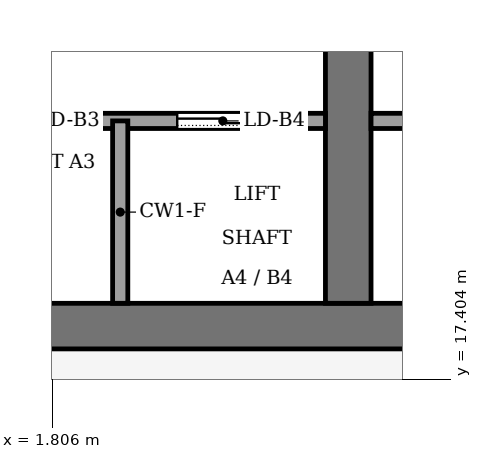
"""IFC4 building model, lengths in metres.
Left out: names, types, materials, properties, quantities, classifications, styles, units other than length and angle.
Written with IfcOpenShell. Run it as: python <this file> out.ifc"""

import sys

from ifc_helpers import new_model, si_unit, direction, frame, frame_2d, origin, place, context, subcontext, project, spatial, rectangle, extrude, element, fill, save


model = new_model("IFC4")
c1 = context("Model", 3, precision=1e-05, world=origin(), true_north=direction((0.0, 1.0)))
c2 = subcontext(c1, "Body", "Model", "MODEL_VIEW")
j1 = project(units=[si_unit("LENGTHUNIT", "METRE"), si_unit("PLANEANGLEUNIT", "RADIAN")], contexts=[c1])
p1 = place(None, origin())
s1 = spatial("IfcSite", under=j1, at=p1, CompositionType="ELEMENT")
p2 = place(p1, origin())
s2 = spatial("IfcBuilding", under=s1, at=p2, CompositionType="ELEMENT")
p3 = place(p2, frame((0.0, 0.0, 306.0)))
s3 = spatial("IfcBuildingStorey", under=s2, at=p3, CompositionType="ELEMENT", Elevation=306.0)
p4 = place(p3, frame((-13.2, 18.1, -0.13), z_axis=(0.0, 0.0, 1.0), x_axis=(1.0, 0.0, 0.0)))
e1 = element("IfcWall", 1, at=p4, inside=s3, PredefinedType="SHEAR", context=c2, shape_type="SweptSolid", body=[
    extrude(rectangle(XDim=26.4, YDim=0.6, at=frame_2d((13.2, 0.0))), origin(), (0.0, 0.0, 1.0), 4.0),
])
p5 = place(p3, frame((5.7, 18.4, -0.13), z_axis=(0.0, 0.0, 1.0), x_axis=(0.0, 1.0, 0.0)))
e2 = element("IfcWall", 2, at=p5, inside=s3, PredefinedType="SHEAR", context=c2, shape_type="SweptSolid", body=[
    extrude(rectangle(XDim=19.2, YDim=0.6, at=frame_2d((9.6, 0.0))), origin(), (0.0, 0.0, 1.0), 4.0),
])
p6 = place(p5, frame((13.3, 0.0, 0.13)))
e3 = element("IfcOpeningElement", 3, at=p6, cuts=e2, PredefinedType="OPENING", context=c2, shape_type="SweptSolid", body=[
    extrude(rectangle(XDim=2.4, YDim=2.4, at=frame_2d((1.2, 1.2))), frame((0.0, 0.31, 0.0), z_axis=(0.0, -1.0, 0.0), x_axis=(1.0, 0.0, 0.0)), (0.0, 0.0, 1.0), 0.62),
])
p7 = place(p3, frame((-5.4, 20.8, 0.0), z_axis=(0.0, 0.0, 1.0), x_axis=(1.0, 0.0, 0.0)))
e4 = element("IfcWall", 4, at=p7, inside=s3, PredefinedType="PARTITIONING", context=c2, shape_type="SweptSolid", body=[
    extrude(rectangle(XDim=10.8, YDim=0.2, at=frame_2d((5.4, 0.0))), origin(), (0.0, 0.0, 1.0), 3.87),
])
p8 = place(p7, frame((0.75, 0.0, 0.0)))
e5 = element("IfcOpeningElement", 5, at=p8, cuts=e4, PredefinedType="OPENING", context=c2, shape_type="SweptSolid", body=[
    extrude(rectangle(XDim=1.2, YDim=2.2, at=frame_2d((0.6, 1.1))), frame((0.0, 0.11, 0.0), z_axis=(0.0, -1.0, 0.0), x_axis=(1.0, 0.0, 0.0)), (0.0, 0.0, 1.0), 0.22),
])
p9 = place(p7, frame((3.45, 0.0, 0.0)))
e6 = element("IfcOpeningElement", 6, at=p9, cuts=e4, PredefinedType="OPENING", context=c2, shape_type="SweptSolid", body=[
    extrude(rectangle(XDim=1.2, YDim=2.2, at=frame_2d((0.6, 1.1))), frame((0.0, 0.11, 0.0), z_axis=(0.0, -1.0, 0.0), x_axis=(1.0, 0.0, 0.0)), (0.0, 0.0, 1.0), 0.22),
])
p10 = place(p7, frame((6.15, 0.0, 0.0)))
e7 = element("IfcOpeningElement", 7, at=p10, cuts=e4, PredefinedType="OPENING", context=c2, shape_type="SweptSolid", body=[
    extrude(rectangle(XDim=1.2, YDim=2.2, at=frame_2d((0.6, 1.1))), frame((0.0, 0.11, 0.0), z_axis=(0.0, -1.0, 0.0), x_axis=(1.0, 0.0, 0.0)), (0.0, 0.0, 1.0), 0.22),
])
p11 = place(p7, frame((8.85, 0.0, 0.0)))
e8 = element("IfcOpeningElement", 8, at=p11, cuts=e4, PredefinedType="OPENING", context=c2, shape_type="SweptSolid", body=[
    extrude(rectangle(XDim=1.2, YDim=2.2, at=frame_2d((0.6, 1.1))), frame((0.0, 0.11, 0.0), z_axis=(0.0, -1.0, 0.0), x_axis=(1.0, 0.0, 0.0)), (0.0, 0.0, 1.0), 0.22),
])
p12 = place(p3, frame((6.0, 20.8, 0.0), z_axis=(0.0, 0.0, 1.0), x_axis=(1.0, 0.0, 0.0)))
e9 = element("IfcWall", 9, at=p12, inside=s3, PredefinedType="PARTITIONING", context=c2, shape_type="SweptSolid", body=[
    extrude(rectangle(XDim=6.6, YDim=0.2, at=frame_2d((3.3, 0.0))), origin(), (0.0, 0.0, 1.0), 3.87),
])
p13 = place(p12, frame((2.8, 0.0, 0.0)))
e10 = element("IfcOpeningElement", 10, at=p13, cuts=e9, PredefinedType="OPENING", context=c2, shape_type="SweptSolid", body=[
    extrude(rectangle(XDim=1.0, YDim=2.1, at=frame_2d((0.5, 1.05))), frame((0.0, 0.11, 0.0), z_axis=(0.0, -1.0, 0.0), x_axis=(1.0, 0.0, 0.0)), (0.0, 0.0, 1.0), 0.22),
])
p14 = place(p3, frame((2.7, 18.4, 0.0), z_axis=(0.0, 0.0, 1.0), x_axis=(0.0, 1.0, 0.0)))
e11 = element("IfcWall", 11, at=p14, inside=s3, PredefinedType="PARTITIONING", context=c2, shape_type="SweptSolid", body=[
    extrude(rectangle(XDim=2.4, YDim=0.2, at=frame_2d((1.2, 0.0))), origin(), (0.0, 0.0, 1.0), 3.87),
])
p15 = place(p10, origin())
e12 = element("IfcDoor", 12, at=p15, inside=s3, OperationType="SLIDING_TO_LEFT", PredefinedType="DOOR", context=c2, shape_type="SweptSolid", body=[
    extrude(rectangle(XDim=1.2, YDim=2.2, at=frame_2d((0.6, 1.1))), frame((0.0, 0.025, 0.0), z_axis=(0.0, -1.0, 0.0), x_axis=(1.0, 0.0, 0.0)), (0.0, 0.0, 1.0), 0.05),
])
fill(e7, e12)
p16 = place(p11, origin())
e13 = element("IfcDoor", 13, at=p16, inside=s3, OperationType="SLIDING_TO_LEFT", PredefinedType="DOOR", context=c2, shape_type="SweptSolid", body=[
    extrude(rectangle(XDim=1.2, YDim=2.2, at=frame_2d((0.6, 1.1))), frame((0.0, 0.025, 0.0), z_axis=(0.0, -1.0, 0.0), x_axis=(1.0, 0.0, 0.0)), (0.0, 0.0, 1.0), 0.05),
])
fill(e8, e13)
save(model, sys.argv[1])
